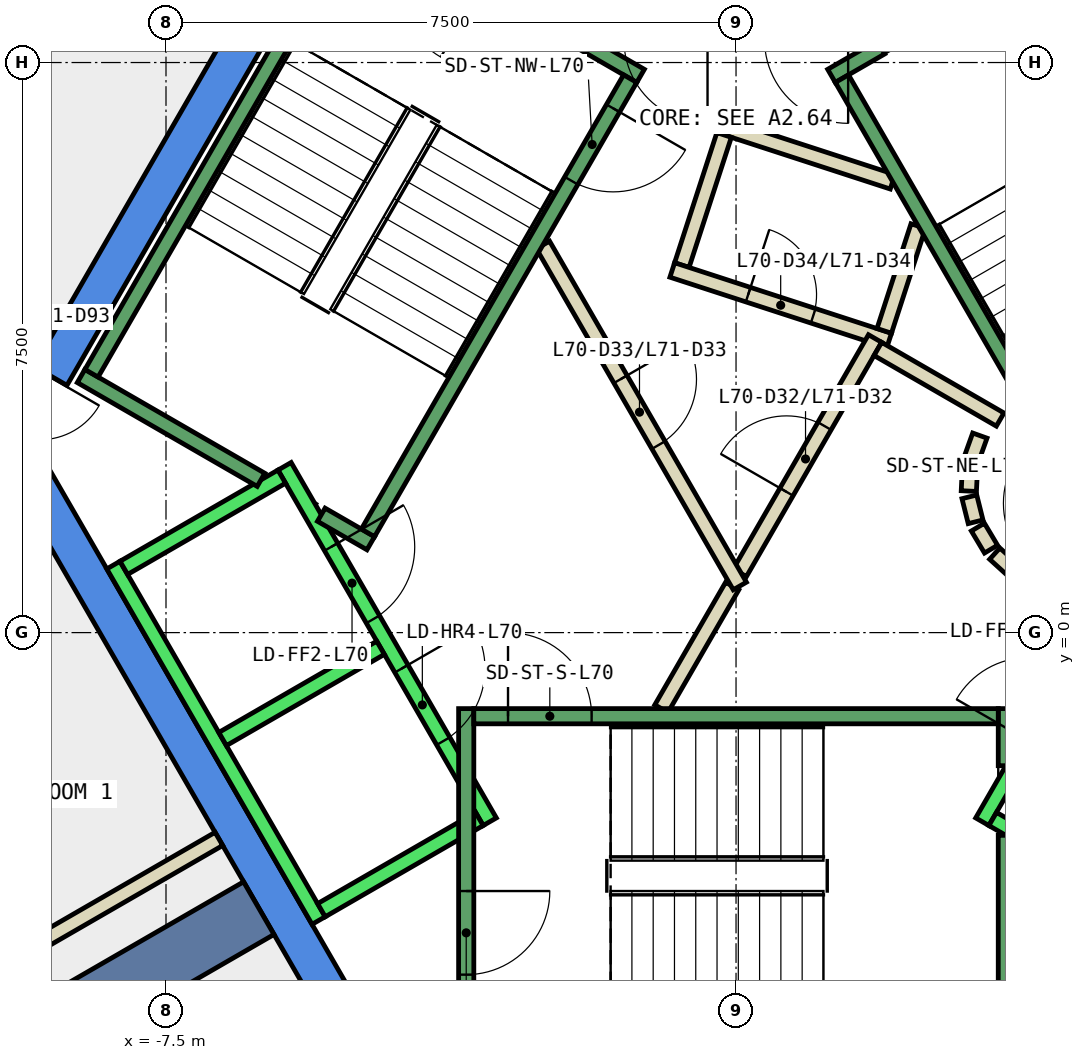
"""IFC4 building model, lengths in metres.
Left out: names, types, materials, properties, quantities, classifications, styles, units other than length and angle.
Written with IfcOpenShell. Run it as: python <this file> out.ifc"""

import sys

from ifc_helpers import new_model, si_unit, direction, frame, frame_2d, origin, place, context, subcontext, project, spatial, polyline, rectangle, outline, extrude, element, fill, save


model = new_model("IFC4")
c1 = context("Model", 3, precision=1e-05, world=origin(), true_north=direction((0.0, 1.0)))
c2 = subcontext(c1, "Body", "Model", "MODEL_VIEW")
j1 = project(units=[si_unit("LENGTHUNIT", "METRE"), si_unit("PLANEANGLEUNIT", "RADIAN")], contexts=[c1])
p1 = place(None, origin())
s1 = spatial("IfcSite", under=j1, at=p1, CompositionType="ELEMENT")
p2 = place(p1, origin())
s2 = spatial("IfcBuilding", under=s1, at=p2, CompositionType="ELEMENT")
p3 = place(p2, frame((0.0, 0.0, 300.8)))
s3 = spatial("IfcBuildingStorey", under=s2, at=p3, CompositionType="ELEMENT", Elevation=300.8)
p4 = place(p3, frame((0.0, 0.0, -0.34)))
e1 = element("IfcWall", 1, at=p4, inside=s3, PredefinedType="SHEAR", context=c2, shape_type="SweptSolid", body=[
    extrude(outline(polyline([(-9.236, 3.502), (-8.803, 3.253), (-4.619, 10.5), (-4.907, 11.0), (-9.236, 3.502)])), origin(), (0.0, 0.0, 1.0), 3.6),
])
p5 = place(p3, frame((0.0, 0.0, -0.34)))
e2 = element("IfcWall", 2, at=p5, inside=s3, PredefinedType="SHEAR", context=c2, shape_type="SweptSolid", body=[
    extrude(outline(polyline([(-9.815, 2.5), (-4.907, -6.0), (-4.619, -5.5), (-9.238, 2.5), (-9.815, 2.5)])), origin(), (0.0, 0.0, 1.0), 3.6),
])
p6 = place(p3, frame((-6.279, -3.625, -0.34), z_axis=(0.0, 0.0, 1.0), x_axis=(-0.866017533419, -0.500013631625, 0.0)))
e3 = element("IfcWall", 3, at=p6, inside=s3, PredefinedType="SHEAR", context=c2, shape_type="SweptSolid", body=[
    extrude(rectangle(XDim=9.0, YDim=0.8, at=frame_2d((4.5, 0.0))), origin(), (0.0, 0.0, 1.0), 3.6),
])
p7 = place(p3, frame((2.06, 5.931, 0.0), z_axis=(0.0, 0.0, 1.0), x_axis=(-0.95092855133, 0.309410552932, 0.0)))
e4 = element("IfcWall", 4, at=p7, inside=s3, PredefinedType="PARTITIONING", context=c2, shape_type="SweptSolid", body=[
    extrude(rectangle(XDim=2.399, YDim=0.2, at=frame_2d((1.199, 0.0))), origin(), (0.0, 0.0, 1.0), 3.26),
])
p8 = place(p3, frame((-0.157, 6.547, 0.0), z_axis=(0.0, 0.0, 1.0), x_axis=(-0.308813127339, -0.951122732555, 0.0)))
e5 = element("IfcWall", 5, at=p8, inside=s3, PredefinedType="PARTITIONING", context=c2, shape_type="SweptSolid", body=[
    extrude(rectangle(XDim=1.8, YDim=0.2, at=frame_2d((0.9, 0.0))), origin(), (0.0, 0.0, 1.0), 3.26),
])
p9 = place(p3, frame((-0.839, 4.771, 0.0), z_axis=(0.0, 0.0, 1.0), x_axis=(0.950961084355, -0.309310549515, 0.0)))
e6 = element("IfcWall", 6, at=p9, inside=s3, PredefinedType="PARTITIONING", context=c2, shape_type="SweptSolid", body=[
    extrude(rectangle(XDim=3.0, YDim=0.2, at=frame_2d((1.5, 0.0))), origin(), (0.0, 0.0, 1.0), 3.26),
])
p10 = place(p9, frame((1.05, 0.0, 0.0)))
e7 = element("IfcOpeningElement", 7, at=p10, cuts=e6, PredefinedType="OPENING", context=c2, shape_type="SweptSolid", body=[
    extrude(rectangle(XDim=0.9, YDim=2.1, at=frame_2d((0.45, 1.05))), frame((0.0, 0.11, 0.0), z_axis=(0.0, -1.0, 0.0), x_axis=(1.0, 0.0, 0.0)), (0.0, 0.0, 1.0), 0.22),
])
p11 = place(p3, frame((1.95, 3.97, 0.0), z_axis=(0.0, 0.0, 1.0), x_axis=(0.308583003896, 0.951197418892, 0.0)))
e8 = element("IfcWall", 8, at=p11, inside=s3, PredefinedType="PARTITIONING", context=c2, shape_type="SweptSolid", body=[
    extrude(rectangle(XDim=1.449, YDim=0.2, at=frame_2d((0.724, 0.0))), origin(), (0.0, 0.0, 1.0), 3.26),
])
p12 = place(p3, frame((-10.543, 6.174, 0.0), z_axis=(0.0, 0.0, 1.0), x_axis=(0.50008212199, 0.86597798544, 0.0)))
e9 = element("IfcWall", 9, at=p12, inside=s3, PredefinedType="PARTITIONING", context=c2, shape_type="SweptSolid", body=[
    extrude(rectangle(XDim=3.995, YDim=0.2, at=frame_2d((1.998, 0.0))), origin(), (0.0, 0.0, 1.0), 3.26),
])
p13 = place(p3, frame((-0.982, -1.0, 0.0), z_axis=(0.0, 0.0, 1.0), x_axis=(0.50024047865, 0.865886518847, 0.0)))
e10 = element("IfcWall", 10, at=p13, inside=s3, PredefinedType="PARTITIONING", context=c2, shape_type="SweptSolid", body=[
    extrude(rectangle(XDim=1.863, YDim=0.2, at=frame_2d((0.931, 0.0))), origin(), (0.0, 0.0, 1.0), 3.26),
])
p14 = place(p3, frame((0.05, 0.787, 0.0), z_axis=(0.0, 0.0, 1.0), x_axis=(0.499954076797, 0.866051915934, 0.0)))
e11 = element("IfcWall", 11, at=p14, inside=s3, PredefinedType="PARTITIONING", context=c2, shape_type="SweptSolid", body=[
    extrude(rectangle(XDim=3.558, YDim=0.2, at=frame_2d((1.779, 0.0))), origin(), (0.0, 0.0, 1.0), 3.26),
])
p15 = place(p14, frame((1.229, 0.0, 0.0)))
e12 = element("IfcOpeningElement", 12, at=p15, cuts=e11, PredefinedType="OPENING", context=c2, shape_type="SweptSolid", body=[
    extrude(rectangle(XDim=1.0, YDim=2.1, at=frame_2d((0.5, 1.05))), frame((0.0, 0.11, 0.0), z_axis=(0.0, -1.0, 0.0), x_axis=(1.0, 0.0, 0.0)), (0.0, 0.0, 1.0), 0.22),
])
p16 = place(p3, frame((1.866, 3.732, 0.0), z_axis=(0.0, 0.0, 1.0), x_axis=(0.866043361281, -0.499968895414, 0.0)))
e13 = element("IfcWall", 13, at=p16, inside=s3, PredefinedType="PARTITIONING", context=c2, shape_type="SweptSolid", body=[
    extrude(rectangle(XDim=1.858, YDim=0.2, at=frame_2d((0.929, 0.0))), origin(), (0.0, 0.0, 1.0), 3.26),
])
p17 = place(p3, frame((3.208, 2.592, 0.0), z_axis=(0.0, 0.0, 1.0), x_axis=(-0.337388820924, -0.941365382578, 0.0)))
e14 = element("IfcWall", 14, at=p17, inside=s3, PredefinedType="PARTITIONING", context=c2, shape_type="SweptSolid", body=[
    extrude(rectangle(XDim=0.338, YDim=0.2, at=frame_2d((0.169, 0.0))), origin(), (0.0, 0.0, 1.0), 3.26),
])
p18 = place(p3, frame((3.079, 2.199, 0.0), z_axis=(0.0, 0.0, 1.0), x_axis=(-0.047771483479, -0.998858290933, 0.0)))
e15 = element("IfcWall", 15, at=p18, inside=s3, PredefinedType="PARTITIONING", context=c2, shape_type="SweptSolid", body=[
    extrude(rectangle(XDim=0.337, YDim=0.2, at=frame_2d((0.169, 0.0))), origin(), (0.0, 0.0, 1.0), 3.26),
])
p19 = place(p3, frame((3.07, 1.786, 0.0), z_axis=(0.0, 0.0, 1.0), x_axis=(0.242705583207, -0.970099994784, 0.0)))
e16 = element("IfcWall", 16, at=p19, inside=s3, PredefinedType="PARTITIONING", context=c2, shape_type="SweptSolid", body=[
    extrude(rectangle(XDim=0.338, YDim=0.2, at=frame_2d((0.169, 0.0))), origin(), (0.0, 0.0, 1.0), 3.26),
])
for number, where, z_axis, x_axis in (
    (17, (3.182, 1.388, 0.0), (0.0, 0.0, 1.0), (0.512, -0.859, 0.0)),
    (18, (3.404, 1.039, 0.0), (0.0, 0.0, 1.0), (0.74, -0.672, 0.0)),
):
    element("IfcWall", number, at=place(p3, frame(where, z_axis=z_axis, x_axis=x_axis)), inside=s3, PredefinedType="PARTITIONING", context=c2, shape_type="SweptSolid", body=[
        extrude(rectangle(XDim=0.338, YDim=0.2, at=frame_2d((0.169, 0.0))), origin(), (0.0, 0.0, 1.0), 3.26),
    ])
p20 = place(p3, frame((-2.54, 5.1, 0.0), z_axis=(0.0, 0.0, 1.0), x_axis=(0.499925051871, -0.866068670783, 0.0)))
e19 = element("IfcWall", 19, at=p20, inside=s3, PredefinedType="PARTITIONING", context=c2, shape_type="SweptSolid", body=[
    extrude(rectangle(XDim=5.181, YDim=0.2, at=frame_2d((2.59, 0.0))), origin(), (0.0, 0.0, 1.0), 3.26),
])
p21 = place(p20, frame((2.04, 0.0, 0.0)))
e20 = element("IfcOpeningElement", 20, at=p21, cuts=e19, PredefinedType="OPENING", context=c2, shape_type="SweptSolid", body=[
    extrude(rectangle(XDim=1.0, YDim=2.1, at=frame_2d((0.5, 1.05))), frame((0.0, 0.11, 0.0), z_axis=(0.0, -1.0, 0.0), x_axis=(1.0, 0.0, 0.0)), (0.0, 0.0, 1.0), 0.22),
])
p22 = place(p3, frame((-6.804, -2.714, 0.0), z_axis=(0.0, 0.0, 1.0), x_axis=(-0.866057565063, -0.499944290893, 0.0)))
e21 = element("IfcWall", 21, at=p22, inside=s3, PredefinedType="PARTITIONING", context=c2, shape_type="SweptSolid", body=[
    extrude(rectangle(XDim=6.7, YDim=0.2, at=frame_2d((3.35, 0.0))), origin(), (0.0, 0.0, 1.0), 3.26),
])
p23 = place(p3, frame((-5.94, 2.188, 0.0), z_axis=(0.0, 0.0, 1.0), x_axis=(0.500034260056, -0.866005622828, 0.0)))
e22 = element("IfcWall", 22, at=p23, inside=s3, PredefinedType="STANDARD", context=c2, shape_type="SweptSolid", body=[
    extrude(rectangle(XDim=5.399, YDim=0.2, at=frame_2d((2.7, 0.0))), origin(), (0.0, 0.0, 1.0), 3.26),
])
p24 = place(p23, frame((3.075, 0.0, 0.0)))
e23 = element("IfcOpeningElement", 23, at=p24, cuts=e22, PredefinedType="OPENING", context=c2, shape_type="SweptSolid", body=[
    extrude(rectangle(XDim=1.1, YDim=2.1, at=frame_2d((0.55, 1.05))), frame((0.0, 0.11, 0.0), z_axis=(0.0, -1.0, 0.0), x_axis=(1.0, 0.0, 0.0)), (0.0, 0.0, 1.0), 0.22),
])
p25 = place(p23, frame((1.225, 0.0, 0.0)))
e24 = element("IfcOpeningElement", 24, at=p25, cuts=e22, PredefinedType="OPENING", context=c2, shape_type="SweptSolid", body=[
    extrude(rectangle(XDim=1.1, YDim=2.1, at=frame_2d((0.55, 1.05))), frame((0.0, 0.11, 0.0), z_axis=(0.0, -1.0, 0.0), x_axis=(1.0, 0.0, 0.0)), (0.0, 0.0, 1.0), 0.22),
])
p26 = place(p3, frame((-8.192, 0.888, 0.0), z_axis=(0.0, 0.0, 1.0), x_axis=(0.500034260056, -0.866005622828, 0.0)))
e25 = element("IfcWall", 25, at=p26, inside=s3, PredefinedType="STANDARD", context=c2, shape_type="SweptSolid", body=[
    extrude(rectangle(XDim=5.399, YDim=0.2, at=frame_2d((2.7, 0.0))), origin(), (0.0, 0.0, 1.0), 3.26),
])
for number, where, z_axis, x_axis in (
    (26, (-5.977, 2.052, 0.0), (0.0, 0.0, 1.0), (-0.866, -0.5, 0.0)),
    (27, (-4.677, -0.2, 0.0), (0.0, 0.0, 1.0), (-0.866, -0.5, 0.0)),
):
    element("IfcWall", number, at=place(p3, frame(where, z_axis=z_axis, x_axis=x_axis)), inside=s3, PredefinedType="STANDARD", context=c2, shape_type="SweptSolid", body=[
        extrude(rectangle(XDim=2.399, YDim=0.2, at=frame_2d((1.2, 0.0))), origin(), (0.0, 0.0, 1.0), 3.26),
    ])
p27 = place(p3, frame((-3.377, -2.452, 0.0), z_axis=(0.0, 0.0, 1.0), x_axis=(-0.865955154139, -0.50012165622, 0.0)))
e28 = element("IfcWall", 28, at=p27, inside=s3, PredefinedType="STANDARD", context=c2, shape_type="SweptSolid", body=[
    extrude(rectangle(XDim=2.4, YDim=0.2, at=frame_2d((1.2, 0.0))), origin(), (0.0, 0.0, 1.0), 3.26),
])
p28 = place(p3, frame((3.24, -2.488, 0.0), z_axis=(0.0, 0.0, 1.0), x_axis=(0.500034260056, 0.866005622828, 0.0)))
e29 = element("IfcWall", 29, at=p28, inside=s3, PredefinedType="STANDARD", context=c2, shape_type="SweptSolid", body=[
    extrude(rectangle(XDim=5.399, YDim=0.2, at=frame_2d((2.7, 0.0))), origin(), (0.0, 0.0, 1.0), 3.26),
])
p29 = place(p28, frame((3.225, 0.0, 0.0)))
e30 = element("IfcOpeningElement", 30, at=p29, cuts=e29, PredefinedType="OPENING", context=c2, shape_type="SweptSolid", body=[
    extrude(rectangle(XDim=1.1, YDim=2.1, at=frame_2d((0.55, 1.05))), frame((0.0, 0.11, 0.0), z_axis=(0.0, -1.0, 0.0), x_axis=(1.0, 0.0, 0.0)), (0.0, 0.0, 1.0), 0.22),
])
p30 = place(p28, frame((1.225, 0.0, 0.0)))
e31 = element("IfcOpeningElement", 31, at=p30, cuts=e29, PredefinedType="OPENING", context=c2, shape_type="SweptSolid", body=[
    extrude(rectangle(XDim=1.1, YDim=2.1, at=frame_2d((0.55, 1.05))), frame((0.0, 0.11, 0.0), z_axis=(0.0, -1.0, 0.0), x_axis=(1.0, 0.0, 0.0)), (0.0, 0.0, 1.0), 0.22),
])
p31 = place(p3, frame((3.377, -2.452, 0.0), z_axis=(0.0, 0.0, 1.0), x_axis=(0.865955154139, -0.50012165622, 0.0)))
e32 = element("IfcWall", 32, at=p31, inside=s3, PredefinedType="STANDARD", context=c2, shape_type="SweptSolid", body=[
    extrude(rectangle(XDim=2.4, YDim=0.2, at=frame_2d((1.2, 0.0))), origin(), (0.0, 0.0, 1.0), 3.26),
])
p32 = place(p3, frame((-3.55, -1.0, 0.0), z_axis=(0.0, 0.0, 1.0), x_axis=(0.0, -1.0, 0.0)))
e33 = element("IfcWall", 33, at=p32, inside=s3, PredefinedType="STANDARD", context=c2, shape_type="SweptSolid", body=[
    extrude(rectangle(XDim=4.4, YDim=0.2, at=frame_2d((2.2, 0.0))), origin(), (0.0, 0.0, 1.0), 3.26),
])
p33 = place(p32, frame((2.4, 0.0, 0.0)))
e34 = element("IfcOpeningElement", 34, at=p33, cuts=e33, PredefinedType="OPENING", context=c2, shape_type="SweptSolid", body=[
    extrude(rectangle(XDim=1.1, YDim=2.2, at=frame_2d((0.55, 1.1))), frame((0.0, 0.11, 0.0), z_axis=(0.0, -1.0, 0.0), x_axis=(1.0, 0.0, 0.0)), (0.0, 0.0, 1.0), 0.22),
])
p34 = place(p3, frame((3.55, -2.667, 0.0), z_axis=(0.0, 0.0, 1.0), x_axis=(0.0, -1.0, 0.0)))
e35 = element("IfcWall", 35, at=p34, inside=s3, PredefinedType="STANDARD", context=c2, shape_type="SweptSolid", body=[
    extrude(rectangle(XDim=2.733, YDim=0.2, at=frame_2d((1.366, 0.0))), origin(), (0.0, 0.0, 1.0), 3.26),
])
p35 = place(p3, frame((3.55, -1.0, 0.0), z_axis=(0.0, 0.0, 1.0), x_axis=(0.0, -1.0, 0.0)))
e36 = element("IfcWall", 36, at=p35, inside=s3, PredefinedType="STANDARD", context=c2, shape_type="SweptSolid", body=[
    extrude(rectangle(XDim=0.751, YDim=0.2, at=frame_2d((0.375, 0.0))), origin(), (0.0, 0.0, 1.0), 3.26),
])
p36 = place(p3, frame((-3.45, -1.1, 0.0), z_axis=(0.0, 0.0, 1.0), x_axis=(1.0, 0.0, 0.0)))
e37 = element("IfcWall", 37, at=p36, inside=s3, PredefinedType="STANDARD", context=c2, shape_type="SweptSolid", body=[
    extrude(rectangle(XDim=6.9, YDim=0.2, at=frame_2d((3.45, 0.0))), origin(), (0.0, 0.0, 1.0), 3.26),
])
p37 = place(p36, frame((0.45, 0.0, 0.0)))
e38 = element("IfcOpeningElement", 38, at=p37, cuts=e37, PredefinedType="OPENING", context=c2, shape_type="SweptSolid", body=[
    extrude(rectangle(XDim=1.1, YDim=2.2, at=frame_2d((0.55, 1.1))), frame((0.0, 0.11, 0.0), z_axis=(0.0, -1.0, 0.0), x_axis=(1.0, 0.0, 0.0)), (0.0, 0.0, 1.0), 0.22),
])
p38 = place(p3, frame((1.256, 7.324, 0.0), z_axis=(0.0, 0.0, 1.0), x_axis=(0.865915093549, 0.500191014278, 0.0)))
e39 = element("IfcWall", 39, at=p38, inside=s3, PredefinedType="STANDARD", context=c2, shape_type="SweptSolid", body=[
    extrude(rectangle(XDim=0.752, YDim=0.2, at=frame_2d((0.376, 0.0))), origin(), (0.0, 0.0, 1.0), 3.26),
])
p39 = place(p3, frame((4.843, 1.312, 0.0), z_axis=(0.0, 0.0, 1.0), x_axis=(-0.499963383562, 0.866046543262, 0.0)))
e40 = element("IfcWall", 40, at=p39, inside=s3, PredefinedType="STANDARD", context=c2, shape_type="SweptSolid", body=[
    extrude(rectangle(XDim=6.9, YDim=0.2, at=frame_2d((3.45, 0.0))), origin(), (0.0, 0.0, 1.0), 3.26),
])
p40 = place(p39, frame((0.45, 0.0, 0.0)))
e41 = element("IfcOpeningElement", 41, at=p40, cuts=e40, PredefinedType="OPENING", context=c2, shape_type="SweptSolid", body=[
    extrude(rectangle(XDim=1.1, YDim=2.2, at=frame_2d((0.55, 1.1))), frame((0.0, 0.11, 0.0), z_axis=(0.0, -1.0, 0.0), x_axis=(1.0, 0.0, 0.0)), (0.0, 0.0, 1.0), 0.22),
])
p41 = place(p3, frame((-1.256, 7.324, 0.0), z_axis=(0.0, 0.0, 1.0), x_axis=(-0.866046073146, 0.499964197906, 0.0)))
e42 = element("IfcWall", 42, at=p41, inside=s3, PredefinedType="STANDARD", context=c2, shape_type="SweptSolid", body=[
    extrude(rectangle(XDim=4.4, YDim=0.2, at=frame_2d((2.2, 0.0))), origin(), (0.0, 0.0, 1.0), 3.26),
])
p42 = place(p41, frame((2.4, 0.0, 0.0)))
e43 = element("IfcOpeningElement", 43, at=p42, cuts=e42, PredefinedType="OPENING", context=c2, shape_type="SweptSolid", body=[
    extrude(rectangle(XDim=1.1, YDim=2.2, at=frame_2d((0.55, 1.1))), frame((0.0, 0.11, 0.0), z_axis=(0.0, -1.0, 0.0), x_axis=(1.0, 0.0, 0.0)), (0.0, 0.0, 1.0), 0.22),
])
p43 = place(p3, frame((-6.25, 2.01, 0.0), z_axis=(0.0, 0.0, 1.0), x_axis=(-0.86611865017, 0.499838457731, 0.0)))
e44 = element("IfcWall", 44, at=p43, inside=s3, PredefinedType="STANDARD", context=c2, shape_type="SweptSolid", body=[
    extrude(rectangle(XDim=2.733, YDim=0.2, at=frame_2d((1.366, 0.0))), origin(), (0.0, 0.0, 1.0), 3.26),
])
p44 = place(p3, frame((-4.806, 1.176, 0.0), z_axis=(0.0, 0.0, 1.0), x_axis=(-0.866558586415, 0.499075361355, 0.0)))
e45 = element("IfcWall", 45, at=p44, inside=s3, PredefinedType="STANDARD", context=c2, shape_type="SweptSolid", body=[
    extrude(rectangle(XDim=0.751, YDim=0.2, at=frame_2d((0.376, 0.0))), origin(), (0.0, 0.0, 1.0), 3.26),
])
p45 = place(p3, frame((-1.393, 7.288, 0.0), z_axis=(0.0, 0.0, 1.0), x_axis=(-0.499963383562, -0.866046543262, 0.0)))
e46 = element("IfcWall", 46, at=p45, inside=s3, PredefinedType="STANDARD", context=c2, shape_type="SweptSolid", body=[
    extrude(rectangle(XDim=6.9, YDim=0.2, at=frame_2d((3.45, 0.0))), origin(), (0.0, 0.0, 1.0), 3.26),
])
p46 = place(p45, frame((0.45, 0.0, 0.0)))
e47 = element("IfcOpeningElement", 47, at=p46, cuts=e46, PredefinedType="OPENING", context=c2, shape_type="SweptSolid", body=[
    extrude(rectangle(XDim=1.1, YDim=2.2, at=frame_2d((0.55, 1.1))), frame((0.0, 0.11, 0.0), z_axis=(0.0, -1.0, 0.0), x_axis=(1.0, 0.0, 0.0)), (0.0, 0.0, 1.0), 0.22),
])
p47 = place(p3, frame((-5.03, 9.388, 0.0), z_axis=(0.0, 0.0, 1.0), x_axis=(-0.499978703459, -0.866037698999, 0.0)))
e48 = element("IfcWall", 48, at=p47, inside=s3, PredefinedType="STANDARD", context=c2, shape_type="SweptSolid", body=[
    extrude(rectangle(XDim=6.9, YDim=0.2, at=frame_2d((3.45, 0.0))), origin(), (0.0, 0.0, 1.0), 3.26),
])
p48 = place(p15, origin())
e49 = element("IfcDoor", 49, at=p48, inside=s3, OperationType="SINGLE_SWING_RIGHT", PredefinedType="DOOR", context=c2, shape_type="SweptSolid", body=[
    extrude(rectangle(XDim=1.0, YDim=2.1, at=frame_2d((0.5, 1.05))), frame((0.0, 0.025, 0.0), z_axis=(0.0, -1.0, 0.0), x_axis=(1.0, 0.0, 0.0)), (0.0, 0.0, 1.0), 0.05),
])
fill(e12, e49)
p49 = place(p21, origin())
e50 = element("IfcDoor", 50, at=p49, inside=s3, OperationType="SINGLE_SWING_RIGHT", PredefinedType="DOOR", context=c2, shape_type="SweptSolid", body=[
    extrude(rectangle(XDim=1.0, YDim=2.1, at=frame_2d((0.5, 1.05))), frame((0.0, 0.025, 0.0), z_axis=(0.0, -1.0, 0.0), x_axis=(1.0, 0.0, 0.0)), (0.0, 0.0, 1.0), 0.05),
])
fill(e20, e50)
p50 = place(p10, origin())
e51 = element("IfcDoor", 51, at=p50, inside=s3, OperationType="SINGLE_SWING_LEFT", PredefinedType="DOOR", context=c2, shape_type="SweptSolid", body=[
    extrude(rectangle(XDim=0.9, YDim=2.1, at=frame_2d((0.45, 1.05))), frame((0.0, 0.025, 0.0), z_axis=(0.0, -1.0, 0.0), x_axis=(1.0, 0.0, 0.0)), (0.0, 0.0, 1.0), 0.05),
])
fill(e7, e51)
p51 = place(p24, origin())
e52 = element("IfcDoor", 52, at=p51, inside=s3, OperationType="SLIDING_TO_LEFT", PredefinedType="DOOR", context=c2, shape_type="SweptSolid", body=[
    extrude(rectangle(XDim=1.1, YDim=2.1, at=frame_2d((0.55, 1.05))), frame((0.0, 0.025, 0.0), z_axis=(0.0, -1.0, 0.0), x_axis=(1.0, 0.0, 0.0)), (0.0, 0.0, 1.0), 0.05),
])
fill(e23, e52)
p52 = place(p25, origin())
e53 = element("IfcDoor", 53, at=p52, inside=s3, OperationType="SLIDING_TO_LEFT", PredefinedType="DOOR", context=c2, shape_type="SweptSolid", body=[
    extrude(rectangle(XDim=1.1, YDim=2.1, at=frame_2d((0.55, 1.05))), frame((0.0, 0.025, 0.0), z_axis=(0.0, -1.0, 0.0), x_axis=(1.0, 0.0, 0.0)), (0.0, 0.0, 1.0), 0.05),
])
fill(e24, e53)
p53 = place(p37, origin())
e54 = element("IfcDoor", 54, at=p53, inside=s3, OperationType="SINGLE_SWING_LEFT", PredefinedType="DOOR", context=c2, shape_type="SweptSolid", body=[
    extrude(rectangle(XDim=1.1, YDim=2.2, at=frame_2d((0.55, 1.1))), frame((0.0, 0.025, 0.0), z_axis=(0.0, -1.0, 0.0), x_axis=(1.0, 0.0, 0.0)), (0.0, 0.0, 1.0), 0.05),
])
fill(e38, e54)
p54 = place(p33, origin())
e55 = element("IfcDoor", 55, at=p54, inside=s3, OperationType="SINGLE_SWING_LEFT", PredefinedType="DOOR", context=c2, shape_type="SweptSolid", body=[
    extrude(rectangle(XDim=1.1, YDim=2.2, at=frame_2d((0.55, 1.1))), frame((0.0, 0.025, 0.0), z_axis=(0.0, -1.0, 0.0), x_axis=(1.0, 0.0, 0.0)), (0.0, 0.0, 1.0), 0.05),
])
fill(e34, e55)
p55 = place(p46, origin())
e56 = element("IfcDoor", 56, at=p55, inside=s3, OperationType="SINGLE_SWING_LEFT", PredefinedType="DOOR", context=c2, shape_type="SweptSolid", body=[
    extrude(rectangle(XDim=1.1, YDim=2.2, at=frame_2d((0.55, 1.1))), frame((0.0, 0.025, 0.0), z_axis=(0.0, -1.0, 0.0), x_axis=(1.0, 0.0, 0.0)), (0.0, 0.0, 1.0), 0.05),
])
fill(e47, e56)
save(model, sys.argv[1])
